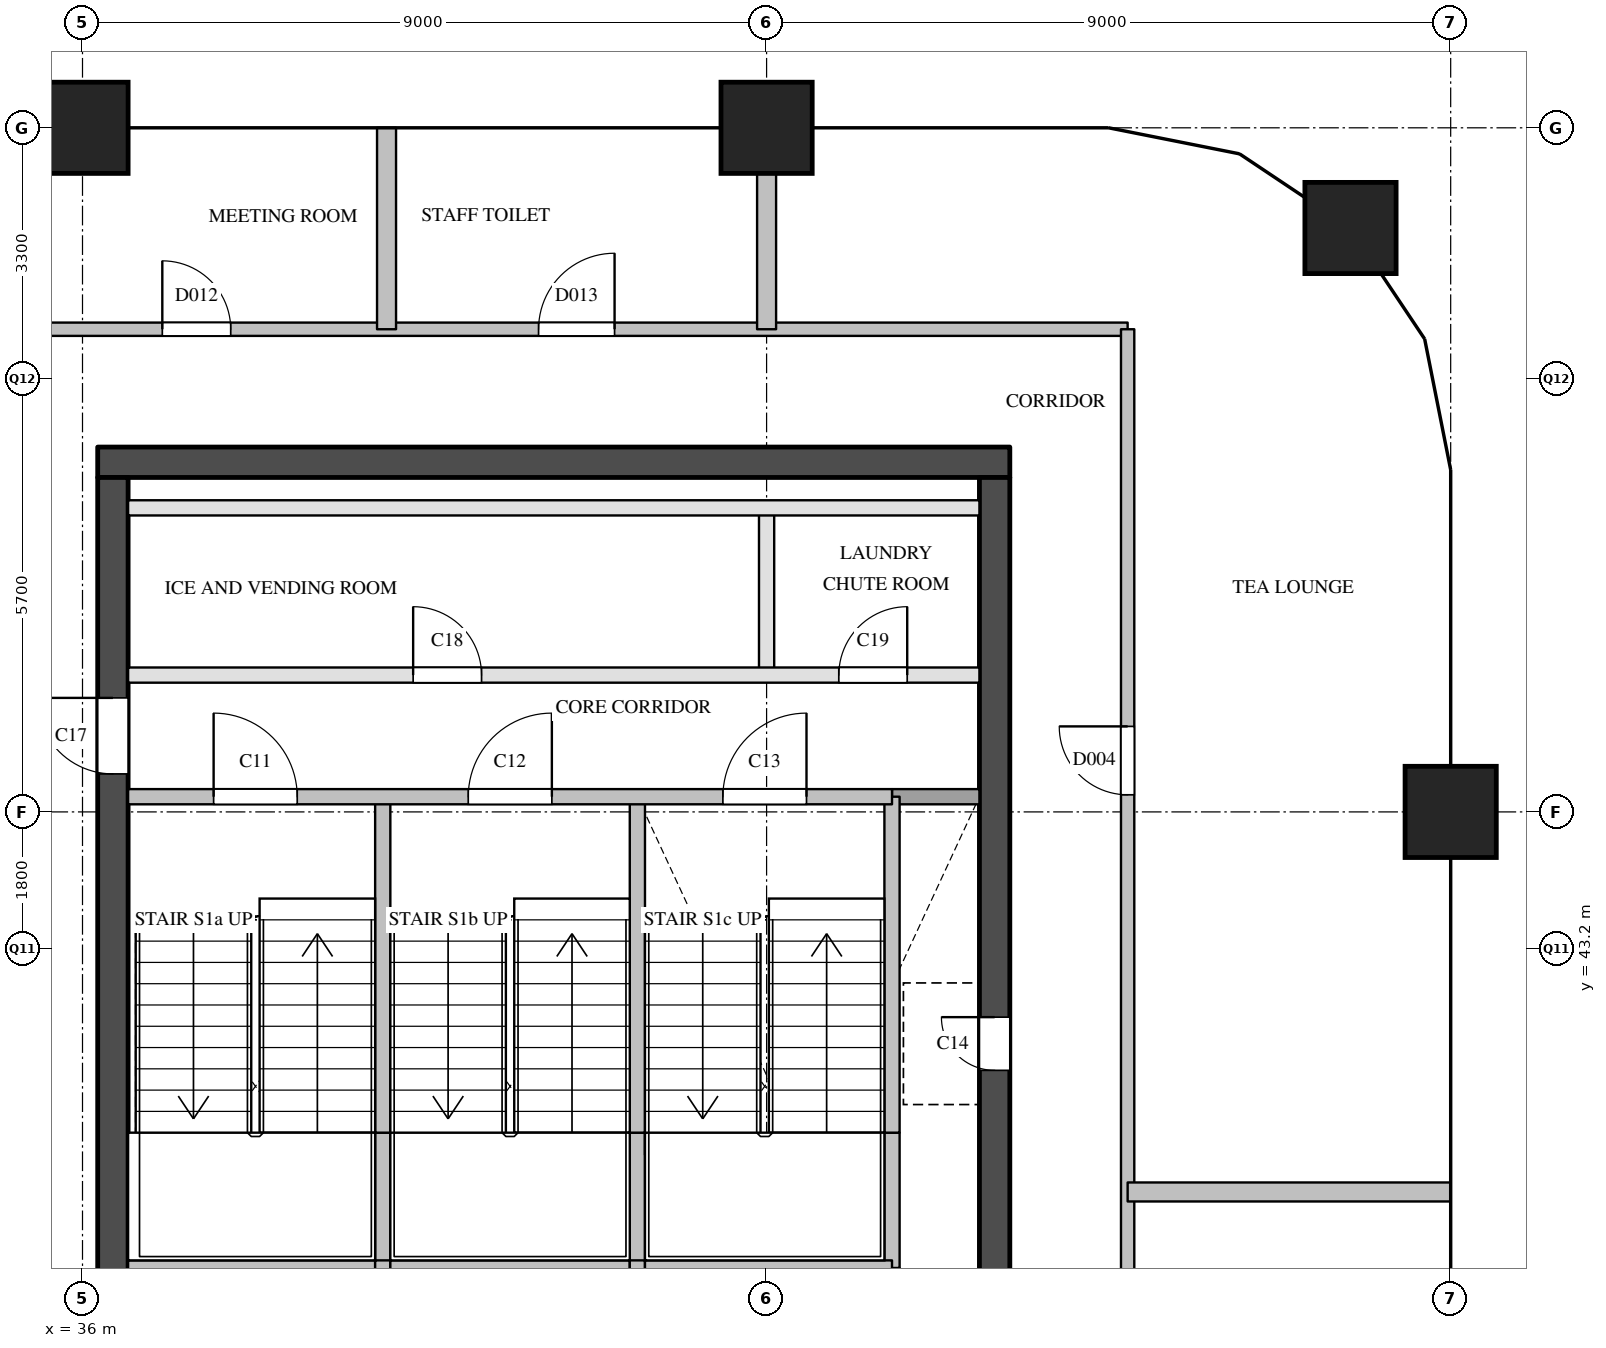
"""IFC4 building model, lengths in metres.
Left out: names, types, materials, properties, quantities, classifications, styles, units other than length and angle.
Written with IfcOpenShell. Run it as: python <this file> out.ifc"""

import sys

from ifc_helpers import new_model, si_unit, direction, frame, frame_2d, origin, origin_2d, place, context, subcontext, project, spatial, rectangle, extrude, element, fill, save


model = new_model("IFC4")
c1 = context("Model", 3, precision=1e-05, world=origin(), true_north=direction((0.0, 1.0)))
c2 = subcontext(c1, "Body", "Model", "MODEL_VIEW")
j1 = project(units=[si_unit("LENGTHUNIT", "METRE"), si_unit("PLANEANGLEUNIT", "RADIAN")], contexts=[c1])
p1 = place(None, origin())
s1 = spatial("IfcSite", under=j1, at=p1, CompositionType="ELEMENT")
p2 = place(p1, origin())
s2 = spatial("IfcBuilding", under=s1, at=p2, CompositionType="ELEMENT")
p3 = place(p2, frame((0.0, 0.0, 265.7)))
s3 = spatial("IfcBuildingStorey", under=s2, at=p3, CompositionType="ELEMENT", Elevation=265.7)
for number, where, z_axis, x_axis in (
    (1, (36.0, 54.0, 0.0), (0.0, 0.0, 1.0), (1.0, 0.0, 0.0)),
    (2, (45.0, 54.0, 0.0), (0.0, 0.0, 1.0), (1.0, 0.0, 0.0)),
    (3, (54.0, 45.0, 0.0), (0.0, 0.0, 1.0), (1.0, 0.0, 0.0)),
    (4, (52.682, 52.682, 0.0), (0.0, 0.0, 1.0), (1.0, 0.0, 0.0)),
):
    element("IfcColumn", number, at=place(p3, frame(where, z_axis=z_axis, x_axis=x_axis)), inside=s3, PredefinedType="COLUMN", context=c2, shape_type="SweptSolid", body=[
        extrude(rectangle(XDim=1.2, YDim=1.2, at=origin_2d()), origin(), (0.0, 0.0, 1.0), 3.9),
    ])
p4 = place(p3, frame((36.2, 49.6, 0.0), z_axis=(0.0, 0.0, 1.0), x_axis=(1.0, 0.0, 0.0)))
e5 = element("IfcWall", 5, at=p4, inside=s3, PredefinedType="SHEAR", context=c2, shape_type="SweptSolid", body=[
    extrude(rectangle(XDim=12.0, YDim=0.4, at=frame_2d((6.0, 0.0))), origin(), (0.0, 0.0, 1.0), 3.6),
])
p5 = place(p3, frame((36.4, 29.1, 0.0), z_axis=(0.0, 0.0, 1.0), x_axis=(0.0, 1.0, 0.0)))
e6 = element("IfcWall", 6, at=p5, inside=s3, PredefinedType="SHEAR", context=c2, shape_type="SweptSolid", body=[
    extrude(rectangle(XDim=20.3, YDim=0.4, at=frame_2d((10.15, 0.0))), origin(), (0.0, 0.0, 1.0), 3.6),
])
p6 = place(p5, frame((3.6, 0.0, 0.0)))
e7 = element("IfcOpeningElement", 7, at=p6, cuts=e6, PredefinedType="OPENING", context=c2, shape_type="SweptSolid", body=[
    extrude(rectangle(XDim=1.8, YDim=2.1, at=frame_2d((0.9, 1.05))), frame((0.0, 0.21, 0.0), z_axis=(0.0, -1.0, 0.0), x_axis=(1.0, 0.0, 0.0)), (0.0, 0.0, 1.0), 0.42),
])
p7 = place(p5, frame((16.4, 0.0, 0.0)))
e8 = element("IfcOpeningElement", 8, at=p7, cuts=e6, PredefinedType="OPENING", context=c2, shape_type="SweptSolid", body=[
    extrude(rectangle(XDim=1.0, YDim=2.1, at=frame_2d((0.5, 1.05))), frame((0.0, 0.21, 0.0), z_axis=(0.0, -1.0, 0.0), x_axis=(1.0, 0.0, 0.0)), (0.0, 0.0, 1.0), 0.42),
])
p8 = place(p3, frame((48.0, 29.1, 0.0), z_axis=(0.0, 0.0, 1.0), x_axis=(0.0, 1.0, 0.0)))
e9 = element("IfcWall", 9, at=p8, inside=s3, PredefinedType="SHEAR", context=c2, shape_type="SweptSolid", body=[
    extrude(rectangle(XDim=20.3, YDim=0.4, at=frame_2d((10.15, 0.0))), origin(), (0.0, 0.0, 1.0), 3.6),
])
p9 = place(p8, frame((12.5, 0.0, 0.0)))
e10 = element("IfcOpeningElement", 10, at=p9, cuts=e9, PredefinedType="OPENING", context=c2, shape_type="SweptSolid", body=[
    extrude(rectangle(XDim=0.7, YDim=2.1, at=frame_2d((0.35, 1.05))), frame((0.0, 0.21, 0.0), z_axis=(0.0, -1.0, 0.0), x_axis=(1.0, 0.0, 0.0)), (0.0, 0.0, 1.0), 0.42),
])
p10 = place(p8, frame((3.9, 0.0, 0.0)))
e11 = element("IfcOpeningElement", 11, at=p10, cuts=e9, PredefinedType="OPENING", context=c2, shape_type="SweptSolid", body=[
    extrude(rectangle(XDim=1.8, YDim=2.1, at=frame_2d((0.9, 1.05))), frame((0.0, 0.21, 0.0), z_axis=(0.0, -1.0, 0.0), x_axis=(1.0, 0.0, 0.0)), (0.0, 0.0, 1.0), 0.42),
])
p11 = place(p3, frame((39.95, 39.0, 0.0), z_axis=(0.0, 0.0, 1.0), x_axis=(0.0, 1.0, 0.0)))
e12 = element("IfcWall", 12, at=p11, inside=s3, PredefinedType="SOLIDWALL", context=c2, shape_type="SweptSolid", body=[
    extrude(rectangle(XDim=1.78, YDim=0.2, at=frame_2d((0.89, 0.0))), origin(), (0.0, 0.0, 1.0), 3.6),
])
p12 = place(p3, frame((39.95, 40.78, 0.0), z_axis=(0.0, 0.0, 1.0), x_axis=(0.0, 1.0, 0.0)))
e13 = element("IfcWall", 13, at=p12, inside=s3, PredefinedType="SOLIDWALL", context=c2, shape_type="SweptSolid", body=[
    extrude(rectangle(XDim=4.42, YDim=0.2, at=frame_2d((2.21, 0.0))), origin(), (0.0, 0.0, 1.0), 3.6),
])
p13 = place(p3, frame((43.3, 39.0, 0.0), z_axis=(0.0, 0.0, 1.0), x_axis=(0.0, 1.0, 0.0)))
e14 = element("IfcWall", 14, at=p13, inside=s3, PredefinedType="SOLIDWALL", context=c2, shape_type="SweptSolid", body=[
    extrude(rectangle(XDim=1.78, YDim=0.2, at=frame_2d((0.89, 0.0))), origin(), (0.0, 0.0, 1.0), 3.6),
])
p14 = place(p3, frame((43.3, 40.78, 0.0), z_axis=(0.0, 0.0, 1.0), x_axis=(0.0, 1.0, 0.0)))
e15 = element("IfcWall", 15, at=p14, inside=s3, PredefinedType="SOLIDWALL", context=c2, shape_type="SweptSolid", body=[
    extrude(rectangle(XDim=4.42, YDim=0.2, at=frame_2d((2.21, 0.0))), origin(), (0.0, 0.0, 1.0), 3.6),
])
p15 = place(p3, frame((45.0, 46.8, 0.0), z_axis=(0.0, 0.0, 1.0), x_axis=(0.0, 1.0, 0.0)))
e16 = element("IfcWall", 16, at=p15, inside=s3, PredefinedType="PARTITIONING", context=c2, shape_type="SweptSolid", body=[
    extrude(rectangle(XDim=2.2, YDim=0.2, at=frame_2d((1.1, 0.0))), origin(), (0.0, 0.0, 1.0), 3.6),
])
p16 = place(p3, frame((46.65, 39.0, 0.0), z_axis=(0.0, 0.0, 1.0), x_axis=(0.0, 1.0, 0.0)))
e17 = element("IfcWall", 17, at=p16, inside=s3, PredefinedType="SOLIDWALL", context=c2, shape_type="SweptSolid", body=[
    extrude(rectangle(XDim=1.78, YDim=0.2, at=frame_2d((0.89, 0.0))), origin(), (0.0, 0.0, 1.0), 3.6),
])
p17 = place(p3, frame((46.65, 40.78, 0.0), z_axis=(0.0, 0.0, 1.0), x_axis=(0.0, 1.0, 0.0)))
e18 = element("IfcWall", 18, at=p17, inside=s3, PredefinedType="SOLIDWALL", context=c2, shape_type="SweptSolid", body=[
    extrude(rectangle(XDim=4.42, YDim=0.2, at=frame_2d((2.21, 0.0))), origin(), (0.0, 0.0, 1.0), 3.6),
])
p18 = place(p3, frame((36.6, 39.0, 0.0), z_axis=(0.0, 0.0, 1.0), x_axis=(1.0, 0.0, 0.0)))
e19 = element("IfcWall", 19, at=p18, inside=s3, PredefinedType="SOLIDWALL", context=c2, shape_type="SweptSolid", body=[
    extrude(rectangle(XDim=3.25, YDim=0.2, at=frame_2d((1.625, 0.0))), origin(), (0.0, 0.0, 1.0), 3.6),
])
p19 = place(p3, frame((39.85, 39.0, 0.0), z_axis=(0.0, 0.0, 1.0), x_axis=(1.0, 0.0, 0.0)))
e20 = element("IfcWall", 20, at=p19, inside=s3, PredefinedType="SOLIDWALL", context=c2, shape_type="SweptSolid", body=[
    extrude(rectangle(XDim=0.2, YDim=0.2, at=frame_2d((0.1, 0.0))), origin(), (0.0, 0.0, 1.0), 3.6),
])
p20 = place(p3, frame((40.05, 39.0, 0.0), z_axis=(0.0, 0.0, 1.0), x_axis=(1.0, 0.0, 0.0)))
e21 = element("IfcWall", 21, at=p20, inside=s3, PredefinedType="SOLIDWALL", context=c2, shape_type="SweptSolid", body=[
    extrude(rectangle(XDim=3.15, YDim=0.2, at=frame_2d((1.575, 0.0))), origin(), (0.0, 0.0, 1.0), 3.6),
])
p21 = place(p3, frame((43.2, 39.0, 0.0), z_axis=(0.0, 0.0, 1.0), x_axis=(1.0, 0.0, 0.0)))
e22 = element("IfcWall", 22, at=p21, inside=s3, PredefinedType="SOLIDWALL", context=c2, shape_type="SweptSolid", body=[
    extrude(rectangle(XDim=0.2, YDim=0.2, at=frame_2d((0.1, 0.0))), origin(), (0.0, 0.0, 1.0), 3.6),
])
p22 = place(p3, frame((43.4, 39.0, 0.0), z_axis=(0.0, 0.0, 1.0), x_axis=(1.0, 0.0, 0.0)))
e23 = element("IfcWall", 23, at=p22, inside=s3, PredefinedType="SOLIDWALL", context=c2, shape_type="SweptSolid", body=[
    extrude(rectangle(XDim=3.25, YDim=0.2, at=frame_2d((1.625, 0.0))), origin(), (0.0, 0.0, 1.0), 3.6),
])
p23 = place(p3, frame((46.65, 45.2, 0.0), z_axis=(0.0, 0.0, 1.0), x_axis=(1.0, 0.0, 0.0)))
e24 = element("IfcWall", 24, at=p23, inside=s3, PredefinedType="SOLIDWALL", context=c2, shape_type="SweptSolid", body=[
    extrude(rectangle(XDim=1.15, YDim=0.2, at=frame_2d((0.575, 0.0))), origin(), (0.0, 0.0, 1.0), 3.6),
])
p24 = place(p3, frame((36.6, 45.2, 0.0), z_axis=(0.0, 0.0, 1.0), x_axis=(1.0, 0.0, 0.0)))
e25 = element("IfcWall", 25, at=p24, inside=s3, PredefinedType="SOLIDWALL", context=c2, shape_type="SweptSolid", body=[
    extrude(rectangle(XDim=10.05, YDim=0.2, at=frame_2d((5.025, 0.0))), origin(), (0.0, 0.0, 1.0), 3.6),
])
p25 = place(p24, frame((1.125, 0.0, 0.0)))
e26 = element("IfcOpeningElement", 26, at=p25, cuts=e25, PredefinedType="OPENING", context=c2, shape_type="SweptSolid", body=[
    extrude(rectangle(XDim=1.1, YDim=2.1, at=frame_2d((0.55, 1.05))), frame((0.0, 0.11, 0.0), z_axis=(0.0, -1.0, 0.0), x_axis=(1.0, 0.0, 0.0)), (0.0, 0.0, 1.0), 0.22),
])
p26 = place(p24, frame((4.475, 0.0, 0.0)))
e27 = element("IfcOpeningElement", 27, at=p26, cuts=e25, PredefinedType="OPENING", context=c2, shape_type="SweptSolid", body=[
    extrude(rectangle(XDim=1.1, YDim=2.1, at=frame_2d((0.55, 1.05))), frame((0.0, 0.11, 0.0), z_axis=(0.0, -1.0, 0.0), x_axis=(1.0, 0.0, 0.0)), (0.0, 0.0, 1.0), 0.22),
])
p27 = place(p24, frame((7.825, 0.0, 0.0)))
e28 = element("IfcOpeningElement", 28, at=p27, cuts=e25, PredefinedType="OPENING", context=c2, shape_type="SweptSolid", body=[
    extrude(rectangle(XDim=1.1, YDim=2.1, at=frame_2d((0.55, 1.05))), frame((0.0, 0.11, 0.0), z_axis=(0.0, -1.0, 0.0), x_axis=(1.0, 0.0, 0.0)), (0.0, 0.0, 1.0), 0.22),
])
p28 = place(p3, frame((36.6, 46.8, 0.0), z_axis=(0.0, 0.0, 1.0), x_axis=(1.0, 0.0, 0.0)))
e29 = element("IfcWall", 29, at=p28, inside=s3, PredefinedType="PARTITIONING", context=c2, shape_type="SweptSolid", body=[
    extrude(rectangle(XDim=11.2, YDim=0.2, at=frame_2d((5.6, 0.0))), origin(), (0.0, 0.0, 1.0), 3.6),
])
p29 = place(p28, frame((3.75, 0.0, 0.0)))
e30 = element("IfcOpeningElement", 30, at=p29, cuts=e29, PredefinedType="OPENING", context=c2, shape_type="SweptSolid", body=[
    extrude(rectangle(XDim=0.9, YDim=2.1, at=frame_2d((0.45, 1.05))), frame((0.0, 0.11, 0.0), z_axis=(0.0, -1.0, 0.0), x_axis=(1.0, 0.0, 0.0)), (0.0, 0.0, 1.0), 0.22),
])
p30 = place(p28, frame((9.35, 0.0, 0.0)))
e31 = element("IfcOpeningElement", 31, at=p30, cuts=e29, PredefinedType="OPENING", context=c2, shape_type="SweptSolid", body=[
    extrude(rectangle(XDim=0.9, YDim=2.1, at=frame_2d((0.45, 1.05))), frame((0.0, 0.11, 0.0), z_axis=(0.0, -1.0, 0.0), x_axis=(1.0, 0.0, 0.0)), (0.0, 0.0, 1.0), 0.22),
])
p31 = place(p3, frame((36.6, 49.0, 0.0), z_axis=(0.0, 0.0, 1.0), x_axis=(1.0, 0.0, 0.0)))
e32 = element("IfcWall", 32, at=p31, inside=s3, PredefinedType="PARTITIONING", context=c2, shape_type="SweptSolid", body=[
    extrude(rectangle(XDim=11.2, YDim=0.2, at=frame_2d((5.6, 0.0))), origin(), (0.0, 0.0, 1.0), 3.6),
])
p32 = place(p3, frame((34.65, 51.35, 0.0), z_axis=(0.0, 0.0, 1.0), x_axis=(1.0, 0.0, 0.0)))
e33 = element("IfcWall", 33, at=p32, inside=s3, PredefinedType="PARTITIONING", context=c2, shape_type="SweptSolid", body=[
    extrude(rectangle(XDim=15.1, YDim=0.175, at=frame_2d((7.55, 0.0))), origin(), (0.0, 0.0, 1.0), 3.6),
])
p33 = place(p32, frame((2.4, 0.0, 0.0)))
e34 = element("IfcOpeningElement", 34, at=p33, cuts=e33, PredefinedType="OPENING", context=c2, shape_type="SweptSolid", body=[
    extrude(rectangle(XDim=0.9, YDim=2.1, at=frame_2d((0.45, 1.05))), frame((0.0, 0.097, 0.0), z_axis=(0.0, -1.0, 0.0), x_axis=(1.0, 0.0, 0.0)), (0.0, 0.0, 1.0), 0.195),
])
p34 = place(p32, frame((7.35, 0.0, 0.0)))
e35 = element("IfcOpeningElement", 35, at=p34, cuts=e33, PredefinedType="OPENING", context=c2, shape_type="SweptSolid", body=[
    extrude(rectangle(XDim=1.0, YDim=2.1, at=frame_2d((0.5, 1.05))), frame((0.0, 0.097, 0.0), z_axis=(0.0, -1.0, 0.0), x_axis=(1.0, 0.0, 0.0)), (0.0, 0.0, 1.0), 0.195),
])
p35 = place(p3, frame((49.75, 28.5, 0.0), z_axis=(0.0, 0.0, 1.0), x_axis=(0.0, 1.0, 0.0)))
e36 = element("IfcWall", 36, at=p35, inside=s3, PredefinedType="PARTITIONING", context=c2, shape_type="SweptSolid", body=[
    extrude(rectangle(XDim=22.85, YDim=0.175, at=frame_2d((11.425, 0.0))), origin(), (0.0, 0.0, 1.0), 3.6),
])
p36 = place(p35, frame((5.3, 0.0, 0.0)))
e37 = element("IfcOpeningElement", 37, at=p36, cuts=e36, PredefinedType="OPENING", context=c2, shape_type="SweptSolid", body=[
    extrude(rectangle(XDim=0.9, YDim=2.1, at=frame_2d((0.45, 1.05))), frame((0.0, 0.097, 0.0), z_axis=(0.0, -1.0, 0.0), x_axis=(1.0, 0.0, 0.0)), (0.0, 0.0, 1.0), 0.195),
])
p37 = place(p35, frame((16.725, 0.0, 0.0)))
e38 = element("IfcOpeningElement", 38, at=p37, cuts=e36, PredefinedType="OPENING", context=c2, shape_type="SweptSolid", body=[
    extrude(rectangle(XDim=0.9, YDim=2.1, at=frame_2d((0.45, 1.05))), frame((0.0, 0.097, 0.0), z_axis=(0.0, -1.0, 0.0), x_axis=(1.0, 0.0, 0.0)), (0.0, 0.0, 1.0), 0.195),
])
p38 = place(p3, frame((49.75, 40.0, 0.0), z_axis=(0.0, 0.0, 1.0), x_axis=(1.0, 0.0, 0.0)))
e39 = element("IfcWall", 39, at=p38, inside=s3, PredefinedType="PARTITIONING", context=c2, shape_type="SweptSolid", body=[
    extrude(rectangle(XDim=4.25, YDim=0.25, at=frame_2d((2.125, 0.0))), origin(), (0.0, 0.0, 1.0), 2.6),
])
p39 = place(p3, frame((40.0, 51.35, 0.0), z_axis=(0.0, 0.0, 1.0), x_axis=(0.0, 1.0, 0.0)))
e40 = element("IfcWall", 40, at=p39, inside=s3, PredefinedType="PARTITIONING", context=c2, shape_type="SweptSolid", body=[
    extrude(rectangle(XDim=2.65, YDim=0.25, at=frame_2d((1.325, 0.0))), origin(), (0.0, 0.0, 1.0), 2.6),
])
p40 = place(p3, frame((45.0, 51.35, 0.0), z_axis=(0.0, 0.0, 1.0), x_axis=(0.0, 1.0, 0.0)))
e41 = element("IfcWall", 41, at=p40, inside=s3, PredefinedType="PARTITIONING", context=c2, shape_type="SweptSolid", body=[
    extrude(rectangle(XDim=2.65, YDim=0.25, at=frame_2d((1.325, 0.0))), origin(), (0.0, 0.0, 1.0), 3.6),
])
p41 = place(p25, origin())
e42 = element("IfcDoor", 42, at=p41, inside=s3, OperationType="SINGLE_SWING_LEFT", PredefinedType="DOOR", context=c2, shape_type="SweptSolid", body=[
    extrude(rectangle(XDim=1.1, YDim=2.1, at=frame_2d((0.55, 1.05))), frame((0.0, 0.025, 0.0), z_axis=(0.0, -1.0, 0.0), x_axis=(1.0, 0.0, 0.0)), (0.0, 0.0, 1.0), 0.05),
])
fill(e26, e42)
p42 = place(p26, origin())
e43 = element("IfcDoor", 43, at=p42, inside=s3, OperationType="SINGLE_SWING_RIGHT", PredefinedType="DOOR", context=c2, shape_type="SweptSolid", body=[
    extrude(rectangle(XDim=1.1, YDim=2.1, at=frame_2d((0.55, 1.05))), frame((0.0, 0.025, 0.0), z_axis=(0.0, -1.0, 0.0), x_axis=(1.0, 0.0, 0.0)), (0.0, 0.0, 1.0), 0.05),
])
fill(e27, e43)
p43 = place(p27, origin())
e44 = element("IfcDoor", 44, at=p43, inside=s3, OperationType="SINGLE_SWING_RIGHT", PredefinedType="DOOR", context=c2, shape_type="SweptSolid", body=[
    extrude(rectangle(XDim=1.1, YDim=2.1, at=frame_2d((0.55, 1.05))), frame((0.0, 0.025, 0.0), z_axis=(0.0, -1.0, 0.0), x_axis=(1.0, 0.0, 0.0)), (0.0, 0.0, 1.0), 0.05),
])
fill(e28, e44)
p44 = place(p9, origin())
e45 = element("IfcDoor", 45, at=p44, inside=s3, OperationType="SINGLE_SWING_RIGHT", PredefinedType="DOOR", context=c2, shape_type="SweptSolid", body=[
    extrude(rectangle(XDim=0.7, YDim=2.1, at=frame_2d((0.35, 1.05))), frame((0.0, 0.025, 0.0), z_axis=(0.0, -1.0, 0.0), x_axis=(1.0, 0.0, 0.0)), (0.0, 0.0, 1.0), 0.05),
])
fill(e10, e45)
p45 = place(p7, origin())
e46 = element("IfcDoor", 46, at=p45, inside=s3, OperationType="SINGLE_SWING_RIGHT", PredefinedType="DOOR", context=c2, shape_type="SweptSolid", body=[
    extrude(rectangle(XDim=1.0, YDim=2.1, at=frame_2d((0.5, 1.05))), frame((0.0, 0.025, 0.0), z_axis=(0.0, -1.0, 0.0), x_axis=(1.0, 0.0, 0.0)), (0.0, 0.0, 1.0), 0.05),
])
fill(e8, e46)
p46 = place(p29, origin())
e47 = element("IfcDoor", 47, at=p46, inside=s3, OperationType="SINGLE_SWING_LEFT", PredefinedType="DOOR", context=c2, shape_type="SweptSolid", body=[
    extrude(rectangle(XDim=0.9, YDim=2.1, at=frame_2d((0.45, 1.05))), frame((0.0, 0.025, 0.0), z_axis=(0.0, -1.0, 0.0), x_axis=(1.0, 0.0, 0.0)), (0.0, 0.0, 1.0), 0.05),
])
fill(e30, e47)
p47 = place(p30, origin())
e48 = element("IfcDoor", 48, at=p47, inside=s3, OperationType="SINGLE_SWING_RIGHT", PredefinedType="DOOR", context=c2, shape_type="SweptSolid", body=[
    extrude(rectangle(XDim=0.9, YDim=2.1, at=frame_2d((0.45, 1.05))), frame((0.0, 0.025, 0.0), z_axis=(0.0, -1.0, 0.0), x_axis=(1.0, 0.0, 0.0)), (0.0, 0.0, 1.0), 0.05),
])
fill(e31, e48)
p48 = place(p37, origin())
e49 = element("IfcDoor", 49, at=p48, inside=s3, OperationType="SINGLE_SWING_RIGHT", PredefinedType="DOOR", context=c2, shape_type="SweptSolid", body=[
    extrude(rectangle(XDim=0.9, YDim=2.1, at=frame_2d((0.45, 1.05))), frame((0.0, 0.025, 0.0), z_axis=(0.0, -1.0, 0.0), x_axis=(1.0, 0.0, 0.0)), (0.0, 0.0, 1.0), 0.05),
])
fill(e38, e49)
p49 = place(p33, origin())
e50 = element("IfcDoor", 50, at=p49, inside=s3, OperationType="SINGLE_SWING_LEFT", PredefinedType="DOOR", context=c2, shape_type="SweptSolid", body=[
    extrude(rectangle(XDim=0.9, YDim=2.1, at=frame_2d((0.45, 1.05))), frame((0.0, 0.025, 0.0), z_axis=(0.0, -1.0, 0.0), x_axis=(1.0, 0.0, 0.0)), (0.0, 0.0, 1.0), 0.05),
])
fill(e34, e50)
p50 = place(p34, origin())
e51 = element("IfcDoor", 51, at=p50, inside=s3, OperationType="SINGLE_SWING_RIGHT", PredefinedType="DOOR", context=c2, shape_type="SweptSolid", body=[
    extrude(rectangle(XDim=1.0, YDim=2.1, at=frame_2d((0.5, 1.05))), frame((0.0, 0.025, 0.0), z_axis=(0.0, -1.0, 0.0), x_axis=(1.0, 0.0, 0.0)), (0.0, 0.0, 1.0), 0.05),
])
fill(e35, e51)
save(model, sys.argv[1])
